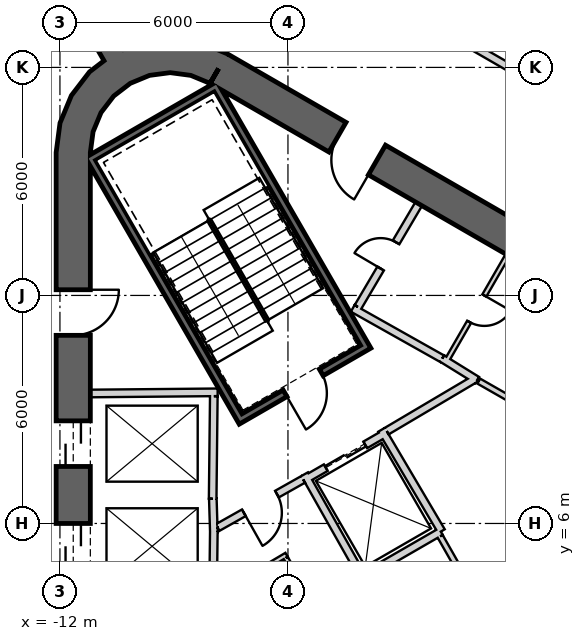
"""IFC4 building model, lengths in metres.
Left out: names, types, materials, properties, quantities, classifications, styles, units other than length and angle.
Written with IfcOpenShell. Run it as: python <this file> out.ifc"""

import sys

from ifc_helpers import new_model, si_unit, direction, frame, frame_2d, origin, place, context, subcontext, project, spatial, polyline, rectangle, outline, extrude, element, fill, save


model = new_model("IFC4")
c1 = context("Model", 3, precision=1e-05, world=origin(), true_north=direction((0.0, 1.0)))
c2 = subcontext(c1, "Body", "Model", "MODEL_VIEW")
j1 = project(units=[si_unit("LENGTHUNIT", "METRE"), si_unit("PLANEANGLEUNIT", "RADIAN")], contexts=[c1])
p1 = place(None, origin())
s1 = spatial("IfcSite", under=j1, at=p1, CompositionType="ELEMENT")
p2 = place(p1, origin())
s2 = spatial("IfcBuilding", under=s1, at=p2, CompositionType="ELEMENT")
p3 = place(p2, frame((0.0, 0.0, 322.1)))
s3 = spatial("IfcBuildingStorey", under=s2, at=p3, CompositionType="ELEMENT", Elevation=322.1)
p4 = place(p3, frame((19.475, 2.208, 0.0), z_axis=(0.0, 0.0, 1.0), x_axis=(-0.866028369851, 0.499994862586, 0.0)))
e1 = element("IfcWall", 1, at=p4, inside=s3, PredefinedType="SHEAR", context=c2, shape_type="SweptSolid", body=[
    extrude(rectangle(XDim=31.523, YDim=0.9, at=frame_2d((15.762, 0.0))), origin(), (0.0, 0.0, 1.0), 3.9),
])
p5 = place(p4, frame((7.062, 0.0, 0.0)))
e2 = element("IfcOpeningElement", 2, at=p5, cuts=e1, PredefinedType="OPENING", context=c2, shape_type="SweptSolid", body=[
    extrude(rectangle(XDim=1.2, YDim=2.4, at=frame_2d((0.6, 1.2))), frame((0.0, 0.46, 0.0), z_axis=(0.0, -1.0, 0.0), x_axis=(1.0, 0.0, 0.0)), (0.0, 0.0, 1.0), 0.92),
])
p6 = place(p4, frame((3.612, 0.0, 0.0)))
e3 = element("IfcOpeningElement", 3, at=p6, cuts=e1, PredefinedType="OPENING", context=c2, shape_type="SweptSolid", body=[
    extrude(rectangle(XDim=1.2, YDim=2.4, at=frame_2d((0.6, 1.2))), frame((0.0, 0.46, 0.0), z_axis=(0.0, -1.0, 0.0), x_axis=(1.0, 0.0, 0.0)), (0.0, 0.0, 1.0), 0.92),
])
p7 = place(p4, frame((26.712, 0.0, 0.0)))
e4 = element("IfcOpeningElement", 4, at=p7, cuts=e1, PredefinedType="OPENING", context=c2, shape_type="SweptSolid", body=[
    extrude(rectangle(XDim=1.2, YDim=2.4, at=frame_2d((0.6, 1.2))), frame((0.0, 0.46, 0.0), z_axis=(0.0, -1.0, 0.0), x_axis=(1.0, 0.0, 0.0)), (0.0, 0.0, 1.0), 0.92),
])
p8 = place(p3, frame((-11.65, 15.762, 0.0), z_axis=(0.0, 0.0, 1.0), x_axis=(0.0, -1.0, 0.0)))
e5 = element("IfcWall", 5, at=p8, inside=s3, PredefinedType="SHEAR", context=c2, shape_type="SweptSolid", body=[
    extrude(rectangle(XDim=31.523, YDim=0.9, at=frame_2d((15.762, 0.0))), origin(), (0.0, 0.0, 1.0), 3.9),
])
p9 = place(p8, frame((7.062, 0.0, 0.0)))
e6 = element("IfcOpeningElement", 6, at=p9, cuts=e5, PredefinedType="OPENING", context=c2, shape_type="SweptSolid", body=[
    extrude(rectangle(XDim=1.2, YDim=2.4, at=frame_2d((0.6, 1.2))), frame((0.0, 0.46, 0.0), z_axis=(0.0, -1.0, 0.0), x_axis=(1.0, 0.0, 0.0)), (0.0, 0.0, 1.0), 0.92),
])
p10 = place(p8, frame((9.762, 0.0, 0.0)))
e7 = element("IfcOpeningElement", 7, at=p10, cuts=e5, PredefinedType="OPENING", context=c2, shape_type="SweptSolid", body=[
    extrude(rectangle(XDim=1.2, YDim=2.4, at=frame_2d((0.6, 1.2))), frame((0.0, 0.46, 0.0), z_axis=(0.0, -1.0, 0.0), x_axis=(1.0, 0.0, 0.0)), (0.0, 0.0, 1.0), 0.92),
])
p11 = place(p8, frame((12.462, 0.0, 0.0)))
e8 = element("IfcOpeningElement", 8, at=p11, cuts=e5, PredefinedType="OPENING", context=c2, shape_type="SweptSolid", body=[
    extrude(rectangle(XDim=1.2, YDim=2.4, at=frame_2d((0.6, 1.2))), frame((0.0, 0.46, 0.0), z_axis=(0.0, -1.0, 0.0), x_axis=(1.0, 0.0, 0.0)), (0.0, 0.0, 1.0), 0.92),
])
p12 = place(p8, frame((15.162, 0.0, 0.0)))
e9 = element("IfcOpeningElement", 9, at=p12, cuts=e5, PredefinedType="OPENING", context=c2, shape_type="SweptSolid", body=[
    extrude(rectangle(XDim=1.2, YDim=2.4, at=frame_2d((0.6, 1.2))), frame((0.0, 0.46, 0.0), z_axis=(0.0, -1.0, 0.0), x_axis=(1.0, 0.0, 0.0)), (0.0, 0.0, 1.0), 0.92),
])
p13 = place(p8, frame((17.862, 0.0, 0.0)))
e10 = element("IfcOpeningElement", 10, at=p13, cuts=e5, PredefinedType="OPENING", context=c2, shape_type="SweptSolid", body=[
    extrude(rectangle(XDim=1.2, YDim=2.4, at=frame_2d((0.6, 1.2))), frame((0.0, 0.46, 0.0), z_axis=(0.0, -1.0, 0.0), x_axis=(1.0, 0.0, 0.0)), (0.0, 0.0, 1.0), 0.92),
])
p14 = place(p8, frame((20.562, 0.0, 0.0)))
e11 = element("IfcOpeningElement", 11, at=p14, cuts=e5, PredefinedType="OPENING", context=c2, shape_type="SweptSolid", body=[
    extrude(rectangle(XDim=1.2, YDim=2.4, at=frame_2d((0.6, 1.2))), frame((0.0, 0.46, 0.0), z_axis=(0.0, -1.0, 0.0), x_axis=(1.0, 0.0, 0.0)), (0.0, 0.0, 1.0), 0.92),
])
p15 = place(p8, frame((23.262, 0.0, 0.0)))
e12 = element("IfcOpeningElement", 12, at=p15, cuts=e5, PredefinedType="OPENING", context=c2, shape_type="SweptSolid", body=[
    extrude(rectangle(XDim=1.2, YDim=2.4, at=frame_2d((0.6, 1.2))), frame((0.0, 0.46, 0.0), z_axis=(0.0, -1.0, 0.0), x_axis=(1.0, 0.0, 0.0)), (0.0, 0.0, 1.0), 0.92),
])
p16 = place(p8, frame((3.612, 0.0, 0.0)))
e13 = element("IfcOpeningElement", 13, at=p16, cuts=e5, PredefinedType="OPENING", context=c2, shape_type="SweptSolid", body=[
    extrude(rectangle(XDim=1.2, YDim=2.4, at=frame_2d((0.6, 1.2))), frame((0.0, 0.46, 0.0), z_axis=(0.0, -1.0, 0.0), x_axis=(1.0, 0.0, 0.0)), (0.0, 0.0, 1.0), 0.92),
])
p17 = place(p8, frame((26.712, 0.0, 0.0)))
e14 = element("IfcOpeningElement", 14, at=p17, cuts=e5, PredefinedType="OPENING", context=c2, shape_type="SweptSolid", body=[
    extrude(rectangle(XDim=1.2, YDim=2.4, at=frame_2d((0.6, 1.2))), frame((0.0, 0.46, 0.0), z_axis=(0.0, -1.0, 0.0), x_axis=(1.0, 0.0, 0.0)), (0.0, 0.0, 1.0), 0.92),
])
p18 = place(p3, origin())
e15 = element("IfcWall", 15, at=p18, inside=s3, PredefinedType="SHEAR", context=c2, shape_type="SweptSolid", body=[
    extrude(outline(polyline([(-7.6, 18.36), (-8.323, 18.659), (-9.1, 18.762), (-9.876, 18.659), (-10.6, 18.36), (-11.221, 17.883), (-11.698, 17.262), (-11.998, 16.538), (-12.1, 15.762), (-11.2, 15.762), (-11.128, 16.305), (-10.919, 16.812), (-10.585, 17.247), (-10.15, 17.58), (-9.644, 17.79), (-9.1, 17.862), (-8.556, 17.79), (-8.05, 17.58), (-7.6, 18.36)])), origin(), (0.0, 0.0, 1.0), 3.9),
])
p19 = place(p3, frame((-10.575, 18.316, 0.0), z_axis=(0.0, 0.0, 1.0), x_axis=(-0.499987805019, 0.866032444446, 0.0)))
e16 = element("IfcWall", 16, at=p19, inside=s3, PredefinedType="SHEAR", context=c2, shape_type="SweptSolid", body=[
    extrude(rectangle(XDim=8.787, YDim=0.6, at=frame_2d((4.394, 0.0))), origin(), (0.0, 0.0, 1.0), 3.9),
])
p20 = place(p19, frame((1.4, 0.0, 0.0)))
e17 = element("IfcOpeningElement", 17, at=p20, cuts=e16, PredefinedType="OPENING", context=c2, shape_type="SweptSolid", body=[
    extrude(rectangle(XDim=1.4, YDim=2.4, at=frame_2d((0.7, 1.2))), frame((0.0, 0.31, 0.0), z_axis=(0.0, -1.0, 0.0), x_axis=(1.0, 0.0, 0.0)), (0.0, 0.0, 1.0), 0.62),
])
p21 = place(p3, frame((-11.2, 9.42, 0.0), z_axis=(0.0, 0.0, 1.0), x_axis=(0.999957167047, 0.009255488683, 0.0)))
e18 = element("IfcWall", 18, at=p21, inside=s3, PredefinedType="PLUMBINGWALL", context=c2, shape_type="SweptSolid", body=[
    extrude(rectangle(XDim=3.35, YDim=0.2, at=frame_2d((1.675, 0.0))), origin(), (0.0, 0.0, 1.0), 3.6),
])
p22 = place(p3, frame((-7.951, 9.35, 0.0), z_axis=(0.0, 0.0, 1.0), x_axis=(-0.011120469654, -0.999938165666, 0.0)))
e19 = element("IfcWall", 19, at=p22, inside=s3, PredefinedType="PLUMBINGWALL", context=c2, shape_type="SweptSolid", body=[
    extrude(rectangle(XDim=2.7, YDim=0.2, at=frame_2d((1.35, 0.0))), origin(), (0.0, 0.0, 1.0), 3.6),
])
p23 = place(p3, frame((-7.977, 6.65, 0.0), z_axis=(0.0, 0.0, 1.0), x_axis=(0.030861509705, -0.999523670164, 0.0)))
e20 = element("IfcWall", 20, at=p23, inside=s3, PredefinedType="PLUMBINGWALL", context=c2, shape_type="SweptSolid", body=[
    extrude(rectangle(XDim=0.878, YDim=0.2, at=frame_2d((0.439, 0.0))), origin(), (0.0, 0.0, 1.0), 3.6),
])
p24 = place(p3, frame((-7.949, 5.895, 0.0), z_axis=(0.0, 0.0, 1.0), x_axis=(-0.012042535896, -0.999927486035, 0.0)))
e21 = element("IfcWall", 21, at=p24, inside=s3, PredefinedType="PLUMBINGWALL", context=c2, shape_type="SweptSolid", body=[
    extrude(rectangle(XDim=1.845, YDim=0.2, at=frame_2d((0.922, 0.0))), origin(), (0.0, 0.0, 1.0), 3.6),
])
p25 = place(p3, frame((-11.245, 15.678, -0.3), z_axis=(0.0, 0.0, 1.0), x_axis=(0.499977274689, -0.866038523851, 0.0)))
e22 = element("IfcWall", 22, at=p25, inside=s3, PredefinedType="SHEAR", context=c2, shape_type="SweptSolid", body=[
    extrude(rectangle(XDim=8.1, YDim=0.2, at=frame_2d((4.05, 0.0))), origin(), (0.0, 0.0, 1.0), 3.9),
])
p26 = place(p3, frame((-7.818, 17.541, -0.3), z_axis=(0.0, 0.0, 1.0), x_axis=(-0.866044365799, -0.499967155389, 0.0)))
e23 = element("IfcWall", 23, at=p26, inside=s3, PredefinedType="SHEAR", context=c2, shape_type="SweptSolid", body=[
    extrude(rectangle(XDim=3.8, YDim=0.2, at=frame_2d((1.9, 0.0))), origin(), (0.0, 0.0, 1.0), 3.9),
])
p27 = place(p3, frame((-7.854, 17.405, -0.3), z_axis=(0.0, 0.0, 1.0), x_axis=(0.499997992926, -0.866026562566, 0.0)))
e24 = element("IfcWall", 24, at=p27, inside=s3, PredefinedType="SHEAR", context=c2, shape_type="SweptSolid", body=[
    extrude(rectangle(XDim=7.9, YDim=0.2, at=frame_2d((3.95, 0.0))), origin(), (0.0, 0.0, 1.0), 3.9),
])
p28 = place(p3, frame((-7.159, 8.8, -0.3), z_axis=(0.0, 0.0, 1.0), x_axis=(0.866047807691, 0.499961193289, 0.0)))
e25 = element("IfcWall", 25, at=p28, inside=s3, PredefinedType="SHEAR", context=c2, shape_type="SweptSolid", body=[
    extrude(rectangle(XDim=3.6, YDim=0.2, at=frame_2d((1.8, 0.0))), origin(), (0.0, 0.0, 1.0), 3.9),
])
p29 = place(p28, frame((1.25, 0.0, 0.3)))
e26 = element("IfcOpeningElement", 26, at=p29, cuts=e25, PredefinedType="OPENING", context=c2, shape_type="SweptSolid", body=[
    extrude(rectangle(XDim=1.1, YDim=2.1, at=frame_2d((0.55, 1.05))), frame((0.0, 0.11, 0.0), z_axis=(0.0, -1.0, 0.0), x_axis=(1.0, 0.0, 0.0)), (0.0, 0.0, 1.0), 0.22),
])
p30 = place(p3, frame((-5.524, 7.168, 0.0), z_axis=(0.0, 0.0, 1.0), x_axis=(0.866024647952, 0.500001309137, 0.0)))
e27 = element("IfcWall", 27, at=p30, inside=s3, PredefinedType="PLUMBINGWALL", context=c2, shape_type="SweptSolid", body=[
    extrude(rectangle(XDim=2.4, YDim=0.2, at=frame_2d((1.2, 0.0))), origin(), (0.0, 0.0, 1.0), 3.6),
])
p31 = place(p30, frame((0.6, 0.0, 0.0)))
e28 = element("IfcOpeningElement", 28, at=p31, cuts=e27, PredefinedType="OPENING", context=c2, shape_type="SweptSolid", body=[
    extrude(rectangle(XDim=1.2, YDim=2.4, at=frame_2d((0.6, 1.2))), frame((0.0, 0.11, 0.0), z_axis=(0.0, -1.0, 0.0), x_axis=(1.0, 0.0, 0.0)), (0.0, 0.0, 1.0), 0.22),
])
p32 = place(p3, frame((-3.538, 8.465, 0.0), z_axis=(0.0, 0.0, 1.0), x_axis=(0.508647062354, -0.860975125052, 0.0)))
e29 = element("IfcWall", 29, at=p32, inside=s3, PredefinedType="PLUMBINGWALL", context=c2, shape_type="SweptSolid", body=[
    extrude(rectangle(XDim=3.1, YDim=0.2, at=frame_2d((1.55, 0.0))), origin(), (0.0, 0.0, 1.0), 3.6),
])
p33 = place(p3, frame((-1.979, 5.786, 0.0), z_axis=(0.0, 0.0, 1.0), x_axis=(-0.866016689309, -0.500015093611, 0.0)))
e30 = element("IfcWall", 30, at=p33, inside=s3, PredefinedType="PLUMBINGWALL", context=c2, shape_type="SweptSolid", body=[
    extrude(rectangle(XDim=2.479, YDim=0.2, at=frame_2d((1.24, 0.0))), origin(), (0.0, 0.0, 1.0), 3.6),
])
p34 = place(p3, frame((-5.562, 7.296, 0.0), z_axis=(0.0, 0.0, 1.0), x_axis=(0.49134651263, -0.870964180966, 0.0)))
e31 = element("IfcWall", 31, at=p34, inside=s3, PredefinedType="PLUMBINGWALL", context=c2, shape_type="SweptSolid", body=[
    extrude(rectangle(XDim=3.0, YDim=0.2, at=frame_2d((1.5, 0.0))), origin(), (0.0, 0.0, 1.0), 3.6),
])
p35 = place(p3, frame((-0.22, 13.06, 0.0), z_axis=(0.0, 0.0, 1.0), x_axis=(-0.499984717929, -0.866034226713, 0.0)))
e32 = element("IfcWall", 32, at=p35, inside=s3, PredefinedType="PARTITIONING", context=c2, shape_type="SweptSolid", body=[
    extrude(rectangle(XDim=3.25, YDim=0.12, at=frame_2d((1.625, 0.0))), origin(), (0.0, 0.0, 1.0), 3.6),
])
p36 = place(p35, frame((1.225, 0.0, 0.0)))
e33 = element("IfcOpeningElement", 33, at=p36, cuts=e32, PredefinedType="OPENING", context=c2, shape_type="SweptSolid", body=[
    extrude(rectangle(XDim=0.8, YDim=2.1, at=frame_2d((0.4, 1.05))), frame((0.0, 0.07, 0.0), z_axis=(0.0, -1.0, 0.0), x_axis=(1.0, 0.0, 0.0)), (0.0, 0.0, 1.0), 0.14),
])
p37 = place(p3, frame((-1.941, 10.339, 0.0), z_axis=(0.0, 0.0, 1.0), x_axis=(0.850216889117, -0.526432561171, 0.0)))
e34 = element("IfcWall", 34, at=p37, inside=s3, PredefinedType="PARTITIONING", context=c2, shape_type="SweptSolid", body=[
    extrude(rectangle(XDim=1.078, YDim=0.2, at=frame_2d((0.539, 0.0))), origin(), (0.0, 0.0, 1.0), 3.6),
])
p38 = place(p3, frame((5.159, 6.236, 0.0), z_axis=(0.0, 0.0, 1.0), x_axis=(-0.868105023632, 0.496380567654, 0.0)))
e35 = element("IfcWall", 35, at=p38, inside=s3, PredefinedType="PLUMBINGWALL", context=c2, shape_type="SweptSolid", body=[
    extrude(rectangle(XDim=7.072, YDim=0.15, at=frame_2d((3.536, 0.0))), origin(), (0.0, 0.0, 1.0), 3.6),
])
p39 = place(p3, frame((-4.296, 11.659, 0.0), z_axis=(0.0, 0.0, 1.0), x_axis=(0.871534483978, -0.490334215854, 0.0)))
e36 = element("IfcWall", 36, at=p39, inside=s3, PredefinedType="PARTITIONING", context=c2, shape_type="SweptSolid", body=[
    extrude(rectangle(XDim=2.7, YDim=0.2, at=frame_2d((1.35, 0.0))), origin(), (0.0, 0.0, 1.0), 3.6),
])
p40 = place(p3, frame((-2.558, 14.409, 0.0), z_axis=(0.0, 0.0, 1.0), x_axis=(-0.508018930956, -0.861345903683, 0.0)))
e37 = element("IfcWall", 37, at=p40, inside=s3, PredefinedType="PARTITIONING", context=c2, shape_type="SweptSolid", body=[
    extrude(rectangle(XDim=3.15, YDim=0.2, at=frame_2d((1.575, 0.0))), origin(), (0.0, 0.0, 1.0), 3.6),
])
p41 = place(p40, frame((1.175, 0.0, 0.0)))
e38 = element("IfcOpeningElement", 38, at=p41, cuts=e37, PredefinedType="OPENING", context=c2, shape_type="SweptSolid", body=[
    extrude(rectangle(XDim=0.8, YDim=2.1, at=frame_2d((0.4, 1.05))), frame((0.0, 0.11, 0.0), z_axis=(0.0, -1.0, 0.0), x_axis=(1.0, 0.0, 0.0)), (0.0, 0.0, 1.0), 0.22),
])
p42 = place(p3, frame((-1.055, 9.818, 0.0), z_axis=(0.0, 0.0, 1.0), x_axis=(-0.860614334655, -0.50925726994, 0.0)))
e39 = element("IfcWall", 39, at=p42, inside=s3, PredefinedType="PARTITIONING", context=c2, shape_type="SweptSolid", body=[
    extrude(rectangle(XDim=2.726, YDim=0.2, at=frame_2d((1.363, 0.0))), origin(), (0.0, 0.0, 1.0), 3.6),
])
p43 = place(p3, frame((-5.6, 7.16, 0.0), z_axis=(0.0, 0.0, 1.0), x_axis=(-0.871363259478, -0.490638431059, 0.0)))
e40 = element("IfcWall", 40, at=p43, inside=s3, PredefinedType="PARTITIONING", context=c2, shape_type="SweptSolid", body=[
    extrude(rectangle(XDim=2.581, YDim=0.2, at=frame_2d((1.291, 0.0))), origin(), (0.0, 0.0, 1.0), 3.6),
])
p44 = place(p43, frame((0.791, 0.0, 0.0)))
e41 = element("IfcOpeningElement", 41, at=p44, cuts=e40, PredefinedType="OPENING", context=c2, shape_type="SweptSolid", body=[
    extrude(rectangle(XDim=1.0, YDim=2.1, at=frame_2d((0.5, 1.05))), frame((0.0, 0.11, 0.0), z_axis=(0.0, -1.0, 0.0), x_axis=(1.0, 0.0, 0.0)), (0.0, 0.0, 1.0), 0.22),
])
p45 = place(p3, frame((-1.994, 5.661, 0.0), z_axis=(0.0, 0.0, 1.0), x_axis=(0.494341211302, -0.869267948798, 0.0)))
e42 = element("IfcWall", 42, at=p45, inside=s3, PredefinedType="PLUMBINGWALL", context=c2, shape_type="SweptSolid", body=[
    extrude(rectangle(XDim=4.361, YDim=0.15, at=frame_2d((2.18, 0.0))), origin(), (0.0, 0.0, 1.0), 3.6),
])
p46 = place(p3, frame((-6.037, 5.176, 0.0), z_axis=(0.0, 0.0, 1.0), x_axis=(-0.860106072674, -0.510115225953, 0.0)))
e43 = element("IfcWall", 43, at=p46, inside=s3, PredefinedType="PARTITIONING", context=c2, shape_type="SweptSolid", body=[
    extrude(rectangle(XDim=2.225, YDim=0.12, at=frame_2d((1.112, 0.0))), origin(), (0.0, 0.0, 1.0), 3.6),
])
p47 = place(p3, frame((-4.558, 2.495, 0.0), z_axis=(0.0, 0.0, 1.0), x_axis=(-0.499990139034, 0.866031096941, 0.0)))
e44 = element("IfcWall", 44, at=p47, inside=s3, PredefinedType="PARTITIONING", context=c2, shape_type="SweptSolid", body=[
    extrude(rectangle(XDim=3.0, YDim=0.12, at=frame_2d((1.5, 0.0))), origin(), (0.0, 0.0, 1.0), 3.6),
])
p48 = place(p3, frame((22.074, 5.153, 0.0), z_axis=(0.0, 0.0, 1.0), x_axis=(-0.866023485483, 0.500003322581, 0.0)))
e45 = element("IfcWall", 45, at=p48, inside=s3, PredefinedType="PARTITIONING", context=c2, shape_type="SweptSolid", body=[
    extrude(rectangle(XDim=32.881, YDim=0.2, at=frame_2d((16.44, 0.0))), origin(), (0.0, 0.0, 1.0), 2.97),
])
p49 = place(p48, frame((28.249, 0.0, 0.0)))
e46 = element("IfcOpeningElement", 46, at=p49, cuts=e45, PredefinedType="OPENING", context=c2, shape_type="SweptSolid", body=[
    extrude(rectangle(XDim=1.0, YDim=2.1, at=frame_2d((0.5, 1.05))), frame((0.0, 0.11, 0.0), z_axis=(0.0, -1.0, 0.0), x_axis=(1.0, 0.0, 0.0)), (0.0, 0.0, 1.0), 0.22),
])
p50 = place(p48, frame((16.387, 0.0, 0.0)))
e47 = element("IfcOpeningElement", 47, at=p50, cuts=e45, PredefinedType="OPENING", context=c2, shape_type="SweptSolid", body=[
    extrude(rectangle(XDim=1.0, YDim=2.1, at=frame_2d((0.5, 1.05))), frame((0.0, 0.11, 0.0), z_axis=(0.0, -1.0, 0.0), x_axis=(1.0, 0.0, 0.0)), (0.0, 0.0, 1.0), 0.22),
])
p51 = place(p48, frame((4.128, 0.0, 0.0)))
e48 = element("IfcOpeningElement", 48, at=p51, cuts=e45, PredefinedType="OPENING", context=c2, shape_type="SweptSolid", body=[
    extrude(rectangle(XDim=1.0, YDim=2.1, at=frame_2d((0.5, 1.05))), frame((0.0, 0.11, 0.0), z_axis=(0.0, -1.0, 0.0), x_axis=(1.0, 0.0, 0.0)), (0.0, 0.0, 1.0), 0.22),
])
p52 = place(p29, origin())
e49 = element("IfcDoor", 49, at=p52, inside=s3, OperationType="SINGLE_SWING_LEFT", PredefinedType="USERDEFINED", context=c2, shape_type="SweptSolid", body=[
    extrude(rectangle(XDim=1.1, YDim=2.1, at=frame_2d((0.55, 1.05))), frame((0.0, 0.025, 0.0), z_axis=(0.0, -1.0, 0.0), x_axis=(1.0, 0.0, 0.0)), (0.0, 0.0, 1.0), 0.05),
])
fill(e26, e49)
p53 = place(p44, origin())
e50 = element("IfcDoor", 50, at=p53, inside=s3, OperationType="SINGLE_SWING_LEFT", PredefinedType="USERDEFINED", context=c2, shape_type="SweptSolid", body=[
    extrude(rectangle(XDim=1.0, YDim=2.1, at=frame_2d((0.5, 1.05))), frame((0.0, 0.025, 0.0), z_axis=(0.0, -1.0, 0.0), x_axis=(1.0, 0.0, 0.0)), (0.0, 0.0, 1.0), 0.05),
])
fill(e41, e50)
p54 = place(p31, origin())
e51 = element("IfcDoor", 51, at=p54, inside=s3, OperationType="SLIDING_TO_LEFT", PredefinedType="USERDEFINED", context=c2, shape_type="SweptSolid", body=[
    extrude(rectangle(XDim=1.2, YDim=2.4, at=frame_2d((0.6, 1.2))), frame((0.0, 0.025, 0.0), z_axis=(0.0, -1.0, 0.0), x_axis=(1.0, 0.0, 0.0)), (0.0, 0.0, 1.0), 0.05),
])
fill(e28, e51)
p55 = place(p41, origin())
e52 = element("IfcDoor", 52, at=p55, inside=s3, OperationType="SINGLE_SWING_RIGHT", PredefinedType="USERDEFINED", context=c2, shape_type="SweptSolid", body=[
    extrude(rectangle(XDim=0.8, YDim=2.1, at=frame_2d((0.4, 1.05))), frame((0.0, 0.025, 0.0), z_axis=(0.0, -1.0, 0.0), x_axis=(1.0, 0.0, 0.0)), (0.0, 0.0, 1.0), 0.05),
])
fill(e38, e52)
p56 = place(p36, origin())
e53 = element("IfcDoor", 53, at=p56, inside=s3, OperationType="SINGLE_SWING_RIGHT", PredefinedType="USERDEFINED", context=c2, shape_type="SweptSolid", body=[
    extrude(rectangle(XDim=0.8, YDim=2.1, at=frame_2d((0.4, 1.05))), frame((0.0, 0.025, 0.0), z_axis=(0.0, -1.0, 0.0), x_axis=(1.0, 0.0, 0.0)), (0.0, 0.0, 1.0), 0.05),
])
fill(e33, e53)
p57 = place(p9, origin())
e54 = element("IfcDoor", 54, at=p57, inside=s3, OperationType="SLIDING_TO_LEFT", PredefinedType="USERDEFINED", context=c2, shape_type="SweptSolid", body=[
    extrude(rectangle(XDim=1.2, YDim=2.4, at=frame_2d((0.6, 1.2))), frame((0.0, 0.025, 0.0), z_axis=(0.0, -1.0, 0.0), x_axis=(1.0, 0.0, 0.0)), (0.0, 0.0, 1.0), 0.05),
])
fill(e6, e54)
p58 = place(p10, origin())
e55 = element("IfcDoor", 55, at=p58, inside=s3, OperationType="SLIDING_TO_LEFT", PredefinedType="USERDEFINED", context=c2, shape_type="SweptSolid", body=[
    extrude(rectangle(XDim=1.2, YDim=2.4, at=frame_2d((0.6, 1.2))), frame((0.0, 0.025, 0.0), z_axis=(0.0, -1.0, 0.0), x_axis=(1.0, 0.0, 0.0)), (0.0, 0.0, 1.0), 0.05),
])
fill(e7, e55)
p59 = place(p7, origin())
e56 = element("IfcDoor", 56, at=p59, inside=s3, OperationType="SINGLE_SWING_LEFT", PredefinedType="USERDEFINED", context=c2, shape_type="SweptSolid", body=[
    extrude(rectangle(XDim=1.2, YDim=2.4, at=frame_2d((0.6, 1.2))), frame((0.0, 0.025, 0.0), z_axis=(0.0, -1.0, 0.0), x_axis=(1.0, 0.0, 0.0)), (0.0, 0.0, 1.0), 0.05),
])
fill(e4, e56)
p60 = place(p16, origin())
e57 = element("IfcDoor", 57, at=p60, inside=s3, OperationType="SINGLE_SWING_LEFT", PredefinedType="USERDEFINED", context=c2, shape_type="SweptSolid", body=[
    extrude(rectangle(XDim=1.2, YDim=2.4, at=frame_2d((0.6, 1.2))), frame((0.0, 0.025, 0.0), z_axis=(0.0, -1.0, 0.0), x_axis=(1.0, 0.0, 0.0)), (0.0, 0.0, 1.0), 0.05),
])
fill(e13, e57)
save(model, sys.argv[1])
